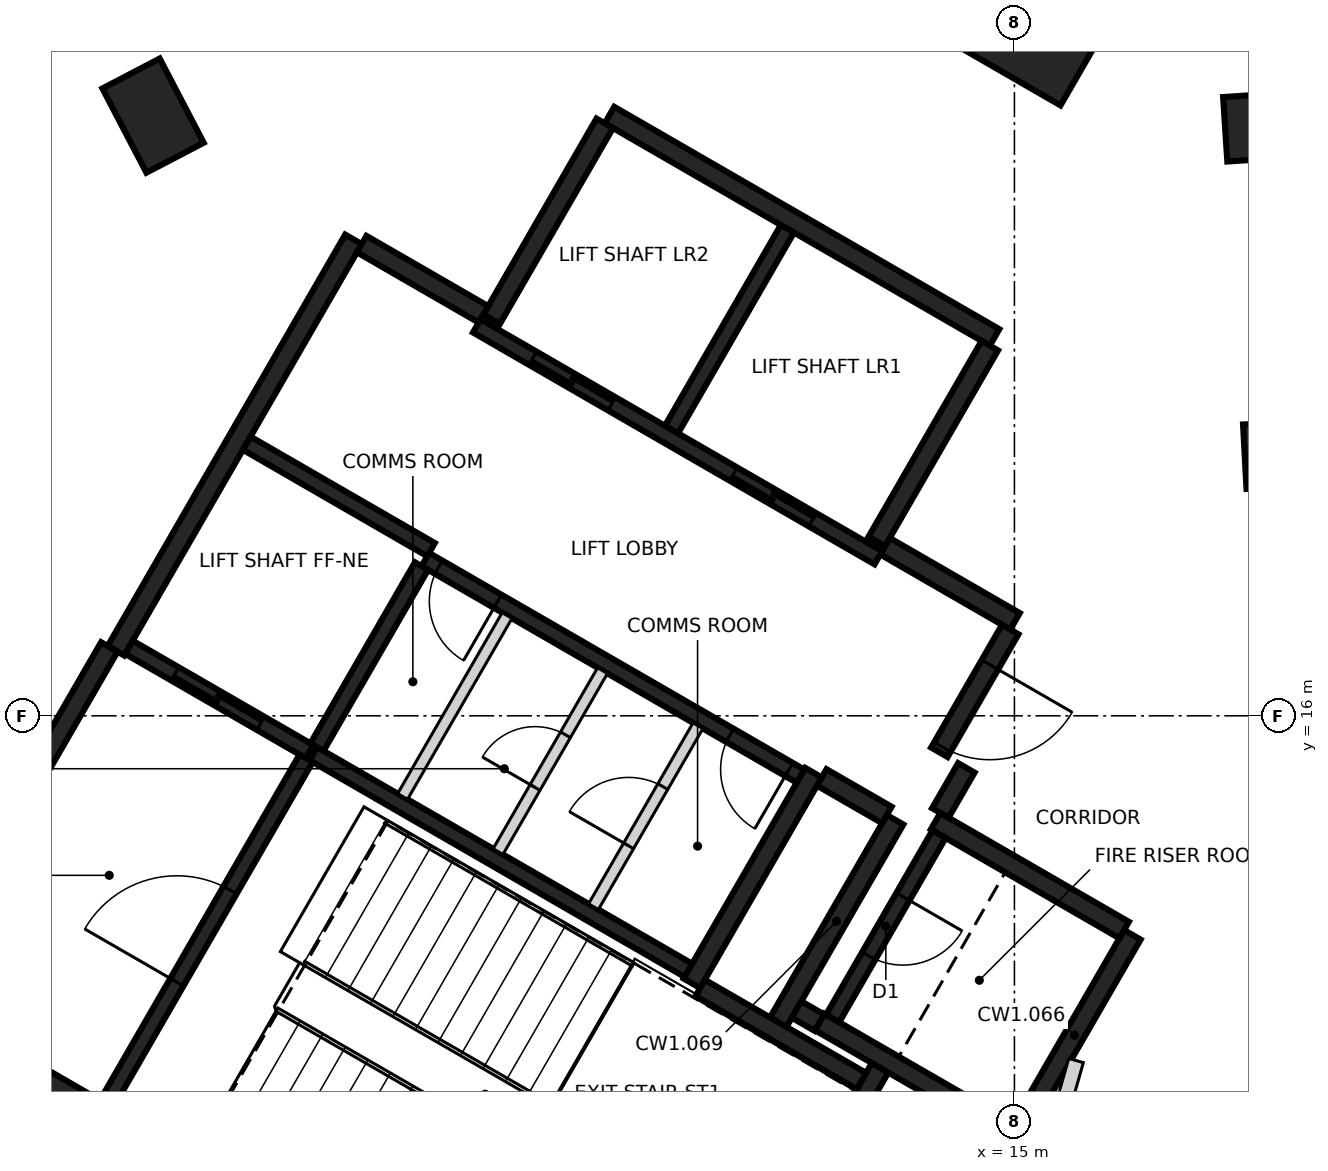
"""IFC4 building model, lengths in metres.
Left out: names, types, materials, properties, quantities, classifications, styles, units other than length and angle.
Written with IfcOpenShell. Run it as: python <this file> out.ifc"""

import sys

from ifc_helpers import new_model, si_unit, direction, frame, frame_2d, origin, origin_2d, place, context, subcontext, project, spatial, rectangle, extrude, element, fill, save


model = new_model("IFC4")
c1 = context("Model", 3, precision=1e-05, world=origin(), true_north=direction((0.0, 1.0)))
c2 = subcontext(c1, "Body", "Model", "MODEL_VIEW")
j1 = project(units=[si_unit("LENGTHUNIT", "METRE"), si_unit("PLANEANGLEUNIT", "RADIAN")], contexts=[c1])
p1 = place(None, origin())
s1 = spatial("IfcSite", under=j1, at=p1, CompositionType="ELEMENT")
p2 = place(p1, origin())
s2 = spatial("IfcBuilding", under=s1, at=p2, CompositionType="ELEMENT")
p3 = place(p2, frame((0.0, 0.0, 143.2)))
s3 = spatial("IfcBuildingStorey", under=s2, at=p3, CompositionType="ELEMENT", Elevation=143.2)
for number, where, z_axis, x_axis in (
    (1, (18.655, 19.442, -0.4), (0.0, 0.0, 1.0), (0.999, 0.054, 0.0)),
    (2, (18.397, 23.757, -0.4), (0.0, 0.0, 1.0), (0.998, 0.065, 0.0)),
    (3, (3.667, 23.896, -0.4), (0.0, 0.0, 1.0), (-0.463, 0.886, 0.0)),
):
    element("IfcColumn", number, at=place(p3, frame(where, z_axis=z_axis, x_axis=x_axis)), inside=s3, PredefinedType="COLUMN", context=c2, shape_type="SweptSolid", body=[
        extrude(rectangle(XDim=1.25, YDim=0.85, at=origin_2d()), origin(), (0.0, 0.0, 1.0), 3.6),
    ])
p4 = place(p3, frame((15.207, 26.34, -0.4), z_axis=(0.0, 0.0, 1.0), x_axis=(0.5, 0.866025403784, 0.0)))
e4 = element("IfcColumn", 4, at=p4, inside=s3, PredefinedType="COLUMN", context=c2, shape_type="SweptSolid", body=[
    extrude(rectangle(XDim=3.6, YDim=3.0, at=origin_2d()), origin(), (0.0, 0.0, 1.0), 3.6),
])
p5 = place(p3, frame((10.42, 6.498, 0.0), z_axis=(0.0, 0.0, 1.0), x_axis=(-0.866021906294, 0.500006057782, 0.0)))
e5 = element("IfcWall", 5, at=p5, inside=s3, PredefinedType="SHEAR", context=c2, shape_type="SweptSolid", body=[
    extrude(rectangle(XDim=11.55, YDim=0.25, at=frame_2d((5.775, 0.0))), origin(), (0.0, 0.0, 1.0), 3.2),
])
p6 = place(p5, frame((10.025, 0.0, 0.0)))
e6 = element("IfcOpeningElement", 6, at=p6, cuts=e5, PredefinedType="OPENING", context=c2, shape_type="SweptSolid", body=[
    extrude(rectangle(XDim=1.2, YDim=2.1, at=frame_2d((0.6, 1.05))), frame((0.0, 0.135, 0.0), z_axis=(0.0, -1.0, 0.0), x_axis=(1.0, 0.0, 0.0)), (0.0, 0.0, 1.0), 0.27),
])
p7 = place(p5, frame((8.725, 0.0, 0.0)))
e7 = element("IfcOpeningElement", 7, at=p7, cuts=e5, PredefinedType="OPENING", context=c2, shape_type="SweptSolid", body=[
    extrude(rectangle(XDim=1.2, YDim=2.1, at=frame_2d((0.6, 1.05))), frame((0.0, 0.135, 0.0), z_axis=(0.0, -1.0, 0.0), x_axis=(1.0, 0.0, 0.0)), (0.0, 0.0, 1.0), 0.27),
])
p8 = place(p3, frame((3.179, 16.856, 0.0), z_axis=(0.0, 0.0, 1.0), x_axis=(0.500004234368, 0.866022959057, 0.0)))
e8 = element("IfcWall", 8, at=p8, inside=s3, PredefinedType="SHEAR", context=c2, shape_type="SweptSolid", body=[
    extrude(rectangle(XDim=6.25, YDim=0.25, at=frame_2d((3.125, 0.0))), origin(), (0.0, 0.0, 1.0), 3.2),
])
p9 = place(p3, frame((9.673, 23.903, 0.0), z_axis=(0.0, 0.0, 1.0), x_axis=(0.86603616409, -0.499981362141, 0.0)))
e9 = element("IfcWall", 9, at=p9, inside=s3, PredefinedType="SHEAR", context=c2, shape_type="SweptSolid", body=[
    extrude(rectangle(XDim=5.85, YDim=0.25, at=frame_2d((2.925, 0.0))), origin(), (0.0, 0.0, 1.0), 3.2),
])
p10 = place(p3, frame((0.48, 12.381, 0.0), z_axis=(0.0, 0.0, 1.0), x_axis=(0.49999885962, 0.866026062182, 0.0)))
e10 = element("IfcWall", 10, at=p10, inside=s3, PredefinedType="SHEAR", context=c2, shape_type="SweptSolid", body=[
    extrude(rectangle(XDim=5.225, YDim=0.25, at=frame_2d((2.612, 0.0))), origin(), (0.0, 0.0, 1.0), 3.2),
])
p11 = place(p10, frame((1.95, 0.0, 0.0)))
e11 = element("IfcOpeningElement", 11, at=p11, cuts=e10, PredefinedType="OPENING", context=c2, shape_type="SweptSolid", body=[
    extrude(rectangle(XDim=1.2, YDim=2.1, at=frame_2d((0.6, 1.05))), frame((0.0, 0.135, 0.0), z_axis=(0.0, -1.0, 0.0), x_axis=(1.0, 0.0, 0.0)), (0.0, 0.0, 1.0), 0.27),
])
p12 = place(p3, frame((13.238, 11.378, 0.0), z_axis=(0.0, 0.0, 1.0), x_axis=(-0.500008851346, -0.866020293397, 0.0)))
e12 = element("IfcWall", 12, at=p12, inside=s3, PredefinedType="SHEAR", context=c2, shape_type="SweptSolid", body=[
    extrude(rectangle(XDim=5.51, YDim=0.25, at=frame_2d((2.755, 0.0))), origin(), (0.0, 0.0, 1.0), 3.2),
])
p13 = place(p3, frame((12.357, 15.252, 0.0), z_axis=(0.0, 0.0, 1.0), x_axis=(-0.500028443584, -0.866008981251, 0.0)))
e13 = element("IfcWall", 13, at=p13, inside=s3, PredefinedType="SHEAR", context=c2, shape_type="SweptSolid", body=[
    extrude(rectangle(XDim=3.2, YDim=0.25, at=frame_2d((1.6, 0.0))), origin(), (0.0, 0.0, 1.0), 3.2),
])
for number, where, z_axis, x_axis in (
    (14, (8.123, 21.219, 0.0), (0.0, 0.0, 1.0), (0.5, 0.866, 0.0)),
    (15, (14.676, 20.87, 0.0), (0.0, 0.0, 1.0), (-0.5, -0.866, 0.0)),
):
    element("IfcWall", number, at=place(p3, frame(where, z_axis=z_axis, x_axis=x_axis)), inside=s3, PredefinedType="SHEAR", context=c2, shape_type="SweptSolid", body=[
        extrude(rectangle(XDim=2.975, YDim=0.25, at=frame_2d((1.487, 0.0))), origin(), (0.0, 0.0, 1.0), 3.2),
    ])
p14 = place(p3, frame((16.552, 13.119, 0.0), z_axis=(0.0, 0.0, 1.0), x_axis=(-0.499978833458, -0.866037623948, 0.0)))
e16 = element("IfcWall", 16, at=p14, inside=s3, PredefinedType="SHEAR", context=c2, shape_type="SweptSolid", body=[
    extrude(rectangle(XDim=3.05, YDim=0.25, at=frame_2d((1.525, 0.0))), origin(), (0.0, 0.0, 1.0), 3.2),
])
p15 = place(p3, frame((14.918, 10.54, 0.0), z_axis=(0.0, 0.0, 1.0), x_axis=(-0.866063538972, 0.499933942099, 0.0)))
e17 = element("IfcWall", 17, at=p15, inside=s3, PredefinedType="SHEAR", context=c2, shape_type="SweptSolid", body=[
    extrude(rectangle(XDim=2.865, YDim=0.25, at=frame_2d((1.432, 0.0))), origin(), (0.0, 0.0, 1.0), 3.2),
])
p16 = place(p3, frame((13.963, 14.614, 0.0), z_axis=(0.0, 0.0, 1.0), x_axis=(0.866042235819, -0.499970844928, 0.0)))
e18 = element("IfcWall", 18, at=p16, inside=s3, PredefinedType="SHEAR", context=c2, shape_type="SweptSolid", body=[
    extrude(rectangle(XDim=2.865, YDim=0.25, at=frame_2d((1.432, 0.0))), origin(), (0.0, 0.0, 1.0), 3.2),
])
p17 = place(p3, frame((11.888, 11.961, 0.0), z_axis=(0.0, 0.0, 1.0), x_axis=(0.500003324108, 0.866023484601, 0.0)))
e19 = element("IfcWall", 19, at=p17, inside=s3, PredefinedType="SHEAR", context=c2, shape_type="SweptSolid", body=[
    extrude(rectangle(XDim=3.085, YDim=0.25, at=frame_2d((1.542, 0.0))), origin(), (0.0, 0.0, 1.0), 3.2),
])
p18 = place(p3, frame((10.865, 12.418, 0.0), z_axis=(0.0, 0.0, 1.0), x_axis=(0.866026229868, -0.499998569178, 0.0)))
e20 = element("IfcWall", 20, at=p18, inside=s3, PredefinedType="SHEAR", context=c2, shape_type="SweptSolid", body=[
    extrude(rectangle(XDim=2.449, YDim=0.25, at=frame_2d((1.225, 0.0))), origin(), (0.0, 0.0, 1.0), 3.2),
])
p19 = place(p3, frame((13.297, 18.231, 0.0), z_axis=(0.0, 0.0, 1.0), x_axis=(0.866043531843, -0.499968599967, 0.0)))
e21 = element("IfcWall", 21, at=p19, inside=s3, PredefinedType="SHEAR", context=c2, shape_type="SweptSolid", body=[
    extrude(rectangle(XDim=1.975, YDim=0.25, at=frame_2d((0.987, 0.0))), origin(), (0.0, 0.0, 1.0), 3.2),
])
p20 = place(p3, frame((6.413, 22.206, 0.0), z_axis=(0.0, 0.0, 1.0), x_axis=(0.866016279763, -0.500015802937, 0.0)))
e22 = element("IfcWall", 22, at=p20, inside=s3, PredefinedType="SHEAR", context=c2, shape_type="SweptSolid", body=[
    extrude(rectangle(XDim=1.849, YDim=0.25, at=frame_2d((0.925, 0.0))), origin(), (0.0, 0.0, 1.0), 3.2),
])
p21 = place(p3, frame((14.945, 17.135, 0.0), z_axis=(0.0, 0.0, 1.0), x_axis=(-0.499983108224, -0.866035156036, 0.0)))
e23 = element("IfcWall", 23, at=p21, inside=s3, PredefinedType="SHEAR", context=c2, shape_type="SweptSolid", body=[
    extrude(rectangle(XDim=1.865, YDim=0.25, at=frame_2d((0.932, 0.0))), origin(), (0.0, 0.0, 1.0), 3.2),
])
p22 = place(p21, frame((0.535, 0.0, 0.0)))
e24 = element("IfcOpeningElement", 24, at=p22, cuts=e23, PredefinedType="OPENING", context=c2, shape_type="SweptSolid", body=[
    extrude(rectangle(XDim=1.25, YDim=2.1, at=frame_2d((0.625, 1.05))), frame((0.0, 0.135, 0.0), z_axis=(0.0, -1.0, 0.0), x_axis=(1.0, 0.0, 0.0)), (0.0, 0.0, 1.0), 0.27),
])
p23 = place(p3, frame((13.322, 14.695, 0.0), z_axis=(0.0, 0.0, 1.0), x_axis=(-0.866017078145, 0.500014420154, 0.0)))
e25 = element("IfcWall", 25, at=p23, inside=s3, PredefinedType="SHEAR", context=c2, shape_type="SweptSolid", body=[
    extrude(rectangle(XDim=0.989, YDim=0.25, at=frame_2d((0.495, 0.0))), origin(), (0.0, 0.0, 1.0), 3.2),
])
p24 = place(p3, frame((14.368, 15.315, 0.0), z_axis=(0.0, 0.0, 1.0), x_axis=(-0.499897359611, -0.866084655132, 0.0)))
e26 = element("IfcWall", 26, at=p24, inside=s3, PredefinedType="SHEAR", context=c2, shape_type="SweptSolid", body=[
    extrude(rectangle(XDim=0.685, YDim=0.25, at=frame_2d((0.342, 0.0))), origin(), (0.0, 0.0, 1.0), 3.2),
])
p25 = place(p3, frame((12.433, 11.964, 0.0), z_axis=(0.0, 0.0, 1.0), x_axis=(-0.866055875208, 0.499947218231, 0.0)))
e27 = element("IfcWall", 27, at=p25, inside=s3, PredefinedType="SHEAR", context=c2, shape_type="SweptSolid", body=[
    extrude(rectangle(XDim=0.345, YDim=0.25, at=frame_2d((0.172, 0.0))), origin(), (0.0, 0.0, 1.0), 3.2),
])
p26 = place(p3, frame((13.21, 18.08, 0.0), z_axis=(0.0, 0.0, 1.0), x_axis=(-0.866030299012, 0.499991521122, 0.0)))
e28 = element("IfcWall", 28, at=p26, inside=s3, PredefinedType="SHEAR", context=c2, shape_type="SweptSolid", body=[
    extrude(rectangle(XDim=6.1, YDim=0.2, at=frame_2d((3.05, 0.0))), origin(), (0.0, 0.0, 1.0), 3.2),
])
p27 = place(p26, frame((1.0, 0.0, 0.0)))
e29 = element("IfcOpeningElement", 29, at=p27, cuts=e28, PredefinedType="OPENING", context=c2, shape_type="SweptSolid", body=[
    extrude(rectangle(XDim=1.2, YDim=2.1, at=frame_2d((0.6, 1.05))), frame((0.0, 0.11, 0.0), z_axis=(0.0, -1.0, 0.0), x_axis=(1.0, 0.0, 0.0)), (0.0, 0.0, 1.0), 0.22),
])
p28 = place(p26, frame((4.05, 0.0, 0.0)))
e30 = element("IfcOpeningElement", 30, at=p28, cuts=e28, PredefinedType="OPENING", context=c2, shape_type="SweptSolid", body=[
    extrude(rectangle(XDim=1.2, YDim=2.1, at=frame_2d((0.6, 1.05))), frame((0.0, 0.11, 0.0), z_axis=(0.0, -1.0, 0.0), x_axis=(1.0, 0.0, 0.0)), (0.0, 0.0, 1.0), 0.22),
])
p29 = place(p3, frame((5.775, 15.502, 0.0), z_axis=(0.0, 0.0, 1.0), x_axis=(0.866020080793, -0.500009219579, 0.0)))
e31 = element("IfcWall", 31, at=p29, inside=s3, PredefinedType="SHEAR", context=c2, shape_type="SweptSolid", body=[
    extrude(rectangle(XDim=5.699, YDim=0.2, at=frame_2d((2.85, 0.0))), origin(), (0.0, 0.0, 1.0), 3.2),
])
p30 = place(p3, frame((12.185, 15.207, 0.0), z_axis=(0.0, 0.0, 1.0), x_axis=(-0.866020080793, 0.500009219579, 0.0)))
e32 = element("IfcWall", 32, at=p30, inside=s3, PredefinedType="SHEAR", context=c2, shape_type="SweptSolid", body=[
    extrude(rectangle(XDim=5.699, YDim=0.2, at=frame_2d((2.85, 0.0))), origin(), (0.0, 0.0, 1.0), 3.2),
])
p31 = place(p30, frame((0.174, 0.0, 0.0)))
e33 = element("IfcOpeningElement", 33, at=p31, cuts=e32, PredefinedType="OPENING", context=c2, shape_type="SweptSolid", body=[
    extrude(rectangle(XDim=0.9, YDim=2.1, at=frame_2d((0.45, 1.05))), frame((0.0, 0.11, 0.0), z_axis=(0.0, -1.0, 0.0), x_axis=(1.0, 0.0, 0.0)), (0.0, 0.0, 1.0), 0.22),
])
p32 = place(p30, frame((4.599, 0.0, 0.0)))
e34 = element("IfcOpeningElement", 34, at=p32, cuts=e32, PredefinedType="OPENING", context=c2, shape_type="SweptSolid", body=[
    extrude(rectangle(XDim=0.9, YDim=2.1, at=frame_2d((0.45, 1.05))), frame((0.0, 0.11, 0.0), z_axis=(0.0, -1.0, 0.0), x_axis=(1.0, 0.0, 0.0)), (0.0, 0.0, 1.0), 0.22),
])
p33 = place(p3, frame((3.057, 10.895, 0.0), z_axis=(0.0, 0.0, 1.0), x_axis=(0.499989418164, 0.866031513124, 0.0)))
e35 = element("IfcWall", 35, at=p33, inside=s3, PredefinedType="SHEAR", context=c2, shape_type="SweptSolid", body=[
    extrude(rectangle(XDim=5.251, YDim=0.2, at=frame_2d((2.625, 0.0))), origin(), (0.0, 0.0, 1.0), 3.2),
])
p34 = place(p33, frame((1.849, 0.0, 0.0)))
e36 = element("IfcOpeningElement", 36, at=p34, cuts=e35, PredefinedType="OPENING", context=c2, shape_type="SweptSolid", body=[
    extrude(rectangle(XDim=1.4, YDim=2.1, at=frame_2d((0.7, 1.05))), frame((0.0, 0.11, 0.0), z_axis=(0.0, -1.0, 0.0), x_axis=(1.0, 0.0, 0.0)), (0.0, 0.0, 1.0), 0.22),
])
p35 = place(p3, frame((10.489, 19.767, 0.0), z_axis=(0.0, 0.0, 1.0), x_axis=(0.499946628782, 0.866056215479, 0.0)))
e37 = element("IfcWall", 37, at=p35, inside=s3, PredefinedType="SHEAR", context=c2, shape_type="SweptSolid", body=[
    extrude(rectangle(XDim=3.048, YDim=0.2, at=frame_2d((1.524, 0.0))), origin(), (0.0, 0.0, 1.0), 3.2),
])
p36 = place(p3, frame((14.008, 14.442, 0.0), z_axis=(0.0, 0.0, 1.0), x_axis=(-0.499986818241, -0.866033014143, 0.0)))
e38 = element("IfcWall", 38, at=p36, inside=s3, PredefinedType="SHEAR", context=c2, shape_type="SweptSolid", body=[
    extrude(rectangle(XDim=2.798, YDim=0.2, at=frame_2d((1.399, 0.0))), origin(), (0.0, 0.0, 1.0), 3.2),
])
p37 = place(p36, frame((0.949, 0.0, 0.0)))
e39 = element("IfcOpeningElement", 39, at=p37, cuts=e38, PredefinedType="OPENING", context=c2, shape_type="SweptSolid", body=[
    extrude(rectangle(XDim=0.9, YDim=2.1, at=frame_2d((0.45, 1.05))), frame((0.0, 0.11, 0.0), z_axis=(0.0, -1.0, 0.0), x_axis=(1.0, 0.0, 0.0)), (0.0, 0.0, 1.0), 0.22),
])
p38 = place(p3, frame((7.199, 17.97, 0.0), z_axis=(0.0, 0.0, 1.0), x_axis=(-0.499968400327, -0.866043647095, 0.0)))
e40 = element("IfcWall", 40, at=p38, inside=s3, PredefinedType="SHEAR", context=c2, shape_type="SweptSolid", body=[
    extrude(rectangle(XDim=2.75, YDim=0.2, at=frame_2d((1.375, 0.0))), origin(), (0.0, 0.0, 1.0), 3.2),
])
p39 = place(p3, frame((5.725, 15.531, 0.0), z_axis=(0.0, 0.0, 1.0), x_axis=(-0.866037306777, 0.499979382845, 0.0)))
e41 = element("IfcWall", 41, at=p39, inside=s3, PredefinedType="SHEAR", context=c2, shape_type="SweptSolid", body=[
    extrude(rectangle(XDim=2.742, YDim=0.2, at=frame_2d((1.371, 0.0))), origin(), (0.0, 0.0, 1.0), 3.2),
])
p40 = place(p39, frame((0.743, 0.0, 0.0)))
e42 = element("IfcOpeningElement", 42, at=p40, cuts=e41, PredefinedType="OPENING", context=c2, shape_type="SweptSolid", body=[
    extrude(rectangle(XDim=1.3, YDim=2.1, at=frame_2d((0.65, 1.05))), frame((0.0, 0.11, 0.0), z_axis=(0.0, -1.0, 0.0), x_axis=(1.0, 0.0, 0.0)), (0.0, 0.0, 1.0), 0.22),
])
p41 = place(p3, frame((4.901, 19.586, 0.0), z_axis=(0.0, 0.0, 1.0), x_axis=(0.866022890907, -0.500004352405, 0.0)))
e43 = element("IfcWall", 43, at=p41, inside=s3, PredefinedType="SHEAR", context=c2, shape_type="SweptSolid", body=[
    extrude(rectangle(XDim=2.799, YDim=0.2, at=frame_2d((1.399, 0.0))), origin(), (0.0, 0.0, 1.0), 3.2),
])
p42 = place(p3, frame((9.462, 13.489, 0.0), z_axis=(0.0, 0.0, 1.0), x_axis=(0.50002746344, 0.86600954718, 0.0)))
e44 = element("IfcWall", 44, at=p42, inside=s3, PredefinedType="PARTITIONING", context=c2, shape_type="SweptSolid", body=[
    extrude(rectangle(XDim=2.748, YDim=0.15, at=frame_2d((1.374, 0.0))), origin(), (0.0, 0.0, 1.0), 3.2),
])
p43 = place(p42, frame((0.924, 0.0, 0.0)))
e45 = element("IfcOpeningElement", 45, at=p43, cuts=e44, PredefinedType="OPENING", context=c2, shape_type="SweptSolid", body=[
    extrude(rectangle(XDim=0.9, YDim=2.1, at=frame_2d((0.45, 1.05))), frame((0.0, 0.085, 0.0), z_axis=(0.0, -1.0, 0.0), x_axis=(1.0, 0.0, 0.0)), (0.0, 0.0, 1.0), 0.17),
])
p44 = place(p3, frame((8.207, 14.214, 0.0), z_axis=(0.0, 0.0, 1.0), x_axis=(0.499922376475, 0.866070215109, 0.0)))
e46 = element("IfcWall", 46, at=p44, inside=s3, PredefinedType="PARTITIONING", context=c2, shape_type="SweptSolid", body=[
    extrude(rectangle(XDim=2.749, YDim=0.15, at=frame_2d((1.374, 0.0))), origin(), (0.0, 0.0, 1.0), 3.2),
])
p45 = place(p44, frame((0.974, 0.0, 0.0)))
e47 = element("IfcOpeningElement", 47, at=p45, cuts=e46, PredefinedType="OPENING", context=c2, shape_type="SweptSolid", body=[
    extrude(rectangle(XDim=0.8, YDim=2.1, at=frame_2d((0.4, 1.05))), frame((0.0, 0.085, 0.0), z_axis=(0.0, -1.0, 0.0), x_axis=(1.0, 0.0, 0.0)), (0.0, 0.0, 1.0), 0.17),
])
p46 = place(p3, frame((6.951, 14.939, 0.0), z_axis=(0.0, 0.0, 1.0), x_axis=(0.50002746344, 0.86600954718, 0.0)))
e48 = element("IfcWall", 48, at=p46, inside=s3, PredefinedType="PARTITIONING", context=c2, shape_type="SweptSolid", body=[
    extrude(rectangle(XDim=2.748, YDim=0.15, at=frame_2d((1.374, 0.0))), origin(), (0.0, 0.0, 1.0), 3.2),
])
p47 = place(p3, frame((15.52, 10.445, 0.0), z_axis=(0.0, 0.0, 1.0), x_axis=(0.274143458758, 0.961688808306, 0.0)))
e49 = element("IfcWall", 49, at=p47, inside=s3, PredefinedType="PARTITIONING", context=c2, shape_type="SweptSolid", body=[
    extrude(rectangle(XDim=1.061, YDim=0.2, at=frame_2d((0.53, 0.0))), origin(), (0.0, 0.0, 1.0), 3.2),
])
p48 = place(p40, origin())
e50 = element("IfcDoor", 50, at=p48, inside=s3, OperationType="SLIDING_TO_LEFT", PredefinedType="DOOR", context=c2, shape_type="SweptSolid", body=[
    extrude(rectangle(XDim=1.3, YDim=2.1, at=frame_2d((0.65, 1.05))), frame((0.0, 0.025, 0.0), z_axis=(0.0, -1.0, 0.0), x_axis=(1.0, 0.0, 0.0)), (0.0, 0.0, 1.0), 0.05),
])
fill(e42, e50)
p49 = place(p27, origin())
e51 = element("IfcDoor", 51, at=p49, inside=s3, OperationType="DOUBLE_DOOR_SLIDING", PredefinedType="DOOR", context=c2, shape_type="SweptSolid", body=[
    extrude(rectangle(XDim=1.2, YDim=2.1, at=frame_2d((0.6, 1.05))), frame((0.0, 0.025, 0.0), z_axis=(0.0, -1.0, 0.0), x_axis=(1.0, 0.0, 0.0)), (0.0, 0.0, 1.0), 0.05),
])
fill(e29, e51)
p50 = place(p28, origin())
e52 = element("IfcDoor", 52, at=p50, inside=s3, OperationType="DOUBLE_DOOR_SLIDING", PredefinedType="DOOR", context=c2, shape_type="SweptSolid", body=[
    extrude(rectangle(XDim=1.2, YDim=2.1, at=frame_2d((0.6, 1.05))), frame((0.0, 0.025, 0.0), z_axis=(0.0, -1.0, 0.0), x_axis=(1.0, 0.0, 0.0)), (0.0, 0.0, 1.0), 0.05),
])
fill(e30, e52)
p51 = place(p22, origin())
e53 = element("IfcDoor", 53, at=p51, inside=s3, OperationType="SINGLE_SWING_LEFT", PredefinedType="DOOR", context=c2, shape_type="SweptSolid", body=[
    extrude(rectangle(XDim=1.25, YDim=2.1, at=frame_2d((0.625, 1.05))), frame((0.0, 0.025, 0.0), z_axis=(0.0, -1.0, 0.0), x_axis=(1.0, 0.0, 0.0)), (0.0, 0.0, 1.0), 0.05),
])
fill(e24, e53)
p52 = place(p7, origin())
e54 = element("IfcDoor", 54, at=p52, inside=s3, OperationType="SINGLE_SWING_RIGHT", PredefinedType="DOOR", context=c2, shape_type="SweptSolid", body=[
    extrude(rectangle(XDim=1.2, YDim=2.1, at=frame_2d((0.6, 1.05))), frame((0.0, 0.025, 0.0), z_axis=(0.0, -1.0, 0.0), x_axis=(1.0, 0.0, 0.0)), (0.0, 0.0, 1.0), 0.05),
])
fill(e7, e54)
p53 = place(p34, origin())
e55 = element("IfcDoor", 55, at=p53, inside=s3, OperationType="SINGLE_SWING_LEFT", PredefinedType="DOOR", context=c2, shape_type="SweptSolid", body=[
    extrude(rectangle(XDim=1.4, YDim=2.1, at=frame_2d((0.7, 1.05))), frame((0.0, 0.025, 0.0), z_axis=(0.0, -1.0, 0.0), x_axis=(1.0, 0.0, 0.0)), (0.0, 0.0, 1.0), 0.05),
])
fill(e36, e55)
p54 = place(p31, origin())
e56 = element("IfcDoor", 56, at=p54, inside=s3, OperationType="SINGLE_SWING_RIGHT", PredefinedType="DOOR", context=c2, shape_type="SweptSolid", body=[
    extrude(rectangle(XDim=0.9, YDim=2.1, at=frame_2d((0.45, 1.05))), frame((0.0, 0.025, 0.0), z_axis=(0.0, -1.0, 0.0), x_axis=(1.0, 0.0, 0.0)), (0.0, 0.0, 1.0), 0.05),
])
fill(e33, e56)
p55 = place(p43, origin())
e57 = element("IfcDoor", 57, at=p55, inside=s3, OperationType="SINGLE_SWING_LEFT", PredefinedType="DOOR", context=c2, shape_type="SweptSolid", body=[
    extrude(rectangle(XDim=0.9, YDim=2.1, at=frame_2d((0.45, 1.05))), frame((0.0, 0.025, 0.0), z_axis=(0.0, -1.0, 0.0), x_axis=(1.0, 0.0, 0.0)), (0.0, 0.0, 1.0), 0.05),
])
fill(e45, e57)
p56 = place(p45, origin())
e58 = element("IfcDoor", 58, at=p56, inside=s3, OperationType="SINGLE_SWING_RIGHT", PredefinedType="DOOR", context=c2, shape_type="SweptSolid", body=[
    extrude(rectangle(XDim=0.8, YDim=2.1, at=frame_2d((0.4, 1.05))), frame((0.0, 0.025, 0.0), z_axis=(0.0, -1.0, 0.0), x_axis=(1.0, 0.0, 0.0)), (0.0, 0.0, 1.0), 0.05),
])
fill(e47, e58)
p57 = place(p32, origin())
e59 = element("IfcDoor", 59, at=p57, inside=s3, OperationType="SINGLE_SWING_LEFT", PredefinedType="DOOR", context=c2, shape_type="SweptSolid", body=[
    extrude(rectangle(XDim=0.9, YDim=2.1, at=frame_2d((0.45, 1.05))), frame((0.0, 0.025, 0.0), z_axis=(0.0, -1.0, 0.0), x_axis=(1.0, 0.0, 0.0)), (0.0, 0.0, 1.0), 0.05),
])
fill(e34, e59)
p58 = place(p37, origin())
e60 = element("IfcDoor", 60, at=p58, inside=s3, OperationType="SINGLE_SWING_RIGHT", PredefinedType="DOOR", context=c2, shape_type="SweptSolid", body=[
    extrude(rectangle(XDim=0.9, YDim=2.1, at=frame_2d((0.45, 1.05))), frame((0.0, 0.025, 0.0), z_axis=(0.0, -1.0, 0.0), x_axis=(1.0, 0.0, 0.0)), (0.0, 0.0, 1.0), 0.05),
])
fill(e39, e60)
save(model, sys.argv[1])
